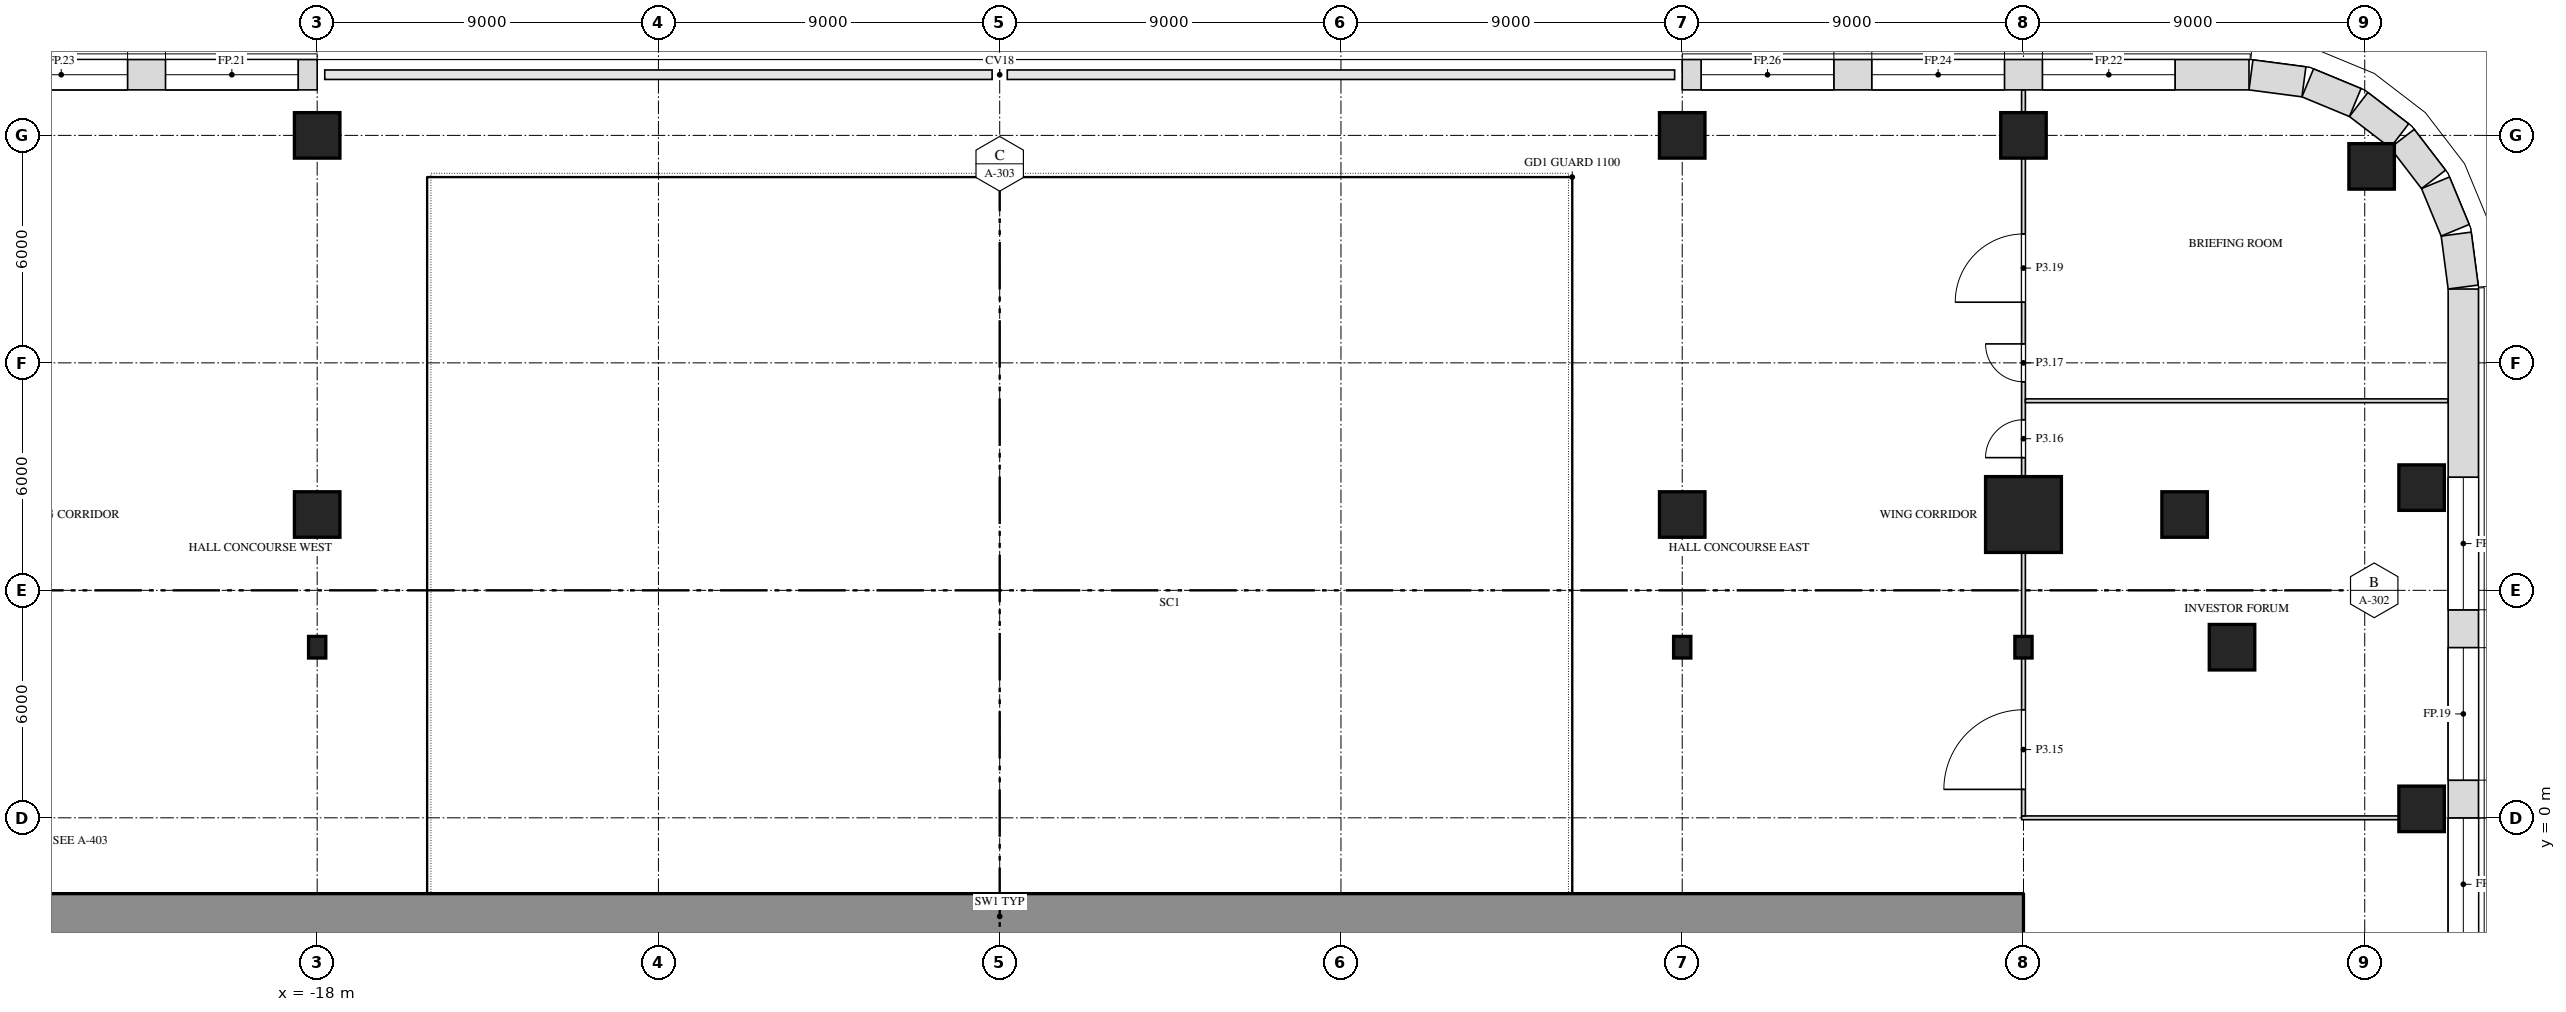
"""IFC4 building model, lengths in metres.
Left out: names, types, materials, properties, quantities, classifications, styles, units other than length and angle.
Written with IfcOpenShell. Run it as: python <this file> out.ifc"""

import sys

from ifc_helpers import new_model, si_unit, direction, frame, frame_2d, origin, origin_2d, place, context, subcontext, project, spatial, rectangle, i_section, extrude, element, fill, save


model = new_model("IFC4")
c1 = context("Model", 3, precision=1e-05, world=origin(), true_north=direction((0.0, 1.0)))
c2 = subcontext(c1, "Body", "Model", "MODEL_VIEW")
j1 = project(units=[si_unit("LENGTHUNIT", "METRE"), si_unit("PLANEANGLEUNIT", "RADIAN")], contexts=[c1])
p1 = place(None, origin())
s1 = spatial("IfcSite", under=j1, at=p1, CompositionType="ELEMENT")
p2 = place(p1, origin())
s2 = spatial("IfcBuilding", under=s1, at=p2, CompositionType="ELEMENT")
p3 = place(p2, frame((0.0, 0.0, 21.0)))
s3 = spatial("IfcBuildingStorey", under=s2, at=p3, CompositionType="ELEMENT", Elevation=21.0)
p4 = place(p3, frame((37.5, 0.236, 0.0), z_axis=(0.0, 0.0, 1.0), x_axis=(1.0, 0.0, 0.0)))
e1 = element("IfcColumn", 1, at=p4, inside=s3, PredefinedType="COLUMN", context=c2, shape_type="SweptSolid", body=[
    extrude(rectangle(XDim=1.2, YDim=1.2, at=origin_2d()), origin(), (0.0, 0.0, 1.0), 6.0),
])
for number, where, z_axis, x_axis in (
    (2, (-18.0, 4.5, 0.0), (0.0, 0.0, 1.0), (1.0, 0.0, 0.0)),
    (3, (18.0, 4.5, 0.0), (0.0, 0.0, 1.0), (1.0, 0.0, 0.0)),
    (4, (27.0, 4.5, 0.0), (0.0, 0.0, 1.0), (1.0, 0.0, 0.0)),
):
    element("IfcColumn", number, at=place(p3, frame(where, z_axis=z_axis, x_axis=x_axis)), inside=s3, PredefinedType="COLUMN", context=c2, shape_type="SweptSolid", body=[
        extrude(i_section(OverallWidth=0.455, OverallDepth=0.569, WebThickness=0.078, FlangeThickness=0.125, at=origin_2d()), origin(), (0.0, 0.0, 1.0), 6.0),
    ])
for number, where, z_axis, x_axis in (
    (5, (32.5, 4.5, 0.0), (0.0, 0.0, 1.0), (1.0, 0.0, 0.0)),
    (6, (-18.0, 8.0, 0.0), (0.0, 0.0, 1.0), (1.0, 0.0, 0.0)),
    (7, (18.0, 8.0, 0.0), (0.0, 0.0, 1.0), (1.0, 0.0, 0.0)),
):
    element("IfcColumn", number, at=place(p3, frame(where, z_axis=z_axis, x_axis=x_axis)), inside=s3, PredefinedType="COLUMN", context=c2, shape_type="SweptSolid", body=[
        extrude(rectangle(XDim=1.2, YDim=1.2, at=origin_2d()), origin(), (0.0, 0.0, 1.0), 6.0),
    ])
p5 = place(p3, frame((27.0, 8.0, 0.0), z_axis=(0.0, 0.0, 1.0), x_axis=(1.0, 0.0, 0.0)))
e8 = element("IfcColumn", 8, at=p5, inside=s3, PredefinedType="COLUMN", context=c2, shape_type="SweptSolid", body=[
    extrude(rectangle(XDim=2.0, YDim=2.0, at=origin_2d()), origin(), (0.0, 0.0, 1.0), 6.0),
])
for number, where, z_axis, x_axis in (
    (9, (31.25, 8.0, 0.0), (0.0, 0.0, 1.0), (1.0, 0.0, 0.0)),
    (10, (37.5, 8.709, 0.0), (0.0, 0.0, 1.0), (1.0, 0.0, 0.0)),
    (11, (36.182, 17.182, 0.0), (0.0, 0.0, 1.0), (1.0, 0.0, 0.0)),
    (12, (-18.0, 18.0, 0.0), (0.0, 0.0, 1.0), (1.0, 0.0, 0.0)),
    (13, (18.0, 18.0, 0.0), (0.0, 0.0, 1.0), (1.0, 0.0, 0.0)),
    (14, (27.0, 18.0, 0.0), (0.0, 0.0, 1.0), (1.0, 0.0, 0.0)),
):
    element("IfcColumn", number, at=place(p3, frame(where, z_axis=z_axis, x_axis=x_axis)), inside=s3, PredefinedType="COLUMN", context=c2, shape_type="SweptSolid", body=[
        extrude(rectangle(XDim=1.2, YDim=1.2, at=origin_2d()), origin(), (0.0, 0.0, 1.0), 6.0),
    ])
p6 = place(p3, frame((-27.0, -2.6, 0.0), z_axis=(0.0, 0.0, 1.0), x_axis=(1.0, 0.0, 0.0)))
e15 = element("IfcWall", 15, at=p6, inside=s3, PredefinedType="SHEAR", context=c2, shape_type="SweptSolid", body=[
    extrude(rectangle(XDim=54.0, YDim=1.2, at=frame_2d((27.0, 0.0))), origin(), (0.0, 0.0, 1.0), 5.7),
])
p7 = place(p3, frame((26.95, 0.0, 0.0), z_axis=(0.0, 0.0, 1.0), x_axis=(1.0, 0.0, 0.0)))
e16 = element("IfcWall", 16, at=p7, inside=s3, PredefinedType="PARTITIONING", context=c2, shape_type="SweptSolid", body=[
    extrude(rectangle(XDim=9.95, YDim=0.1, at=frame_2d((4.975, 0.0))), origin(), (0.0, 0.0, 1.0), 5.088),
])
p8 = place(p3, frame((27.0, 0.05, 0.0), z_axis=(0.0, 0.0, 1.0), x_axis=(0.0, 1.0, 0.0)))
e17 = element("IfcWall", 17, at=p8, inside=s3, PredefinedType="PARTITIONING", context=c2, shape_type="SweptSolid", body=[
    extrude(rectangle(XDim=4.166, YDim=0.1, at=frame_2d((2.083, 0.0))), origin(), (0.0, 0.0, 1.0), 5.088),
])
p9 = place(p8, frame((0.7, 0.0, 0.0)))
e18 = element("IfcOpeningElement", 18, at=p9, cuts=e17, PredefinedType="OPENING", context=c2, shape_type="SweptSolid", body=[
    extrude(rectangle(XDim=2.1, YDim=2.4, at=frame_2d((1.05, 1.2))), frame((0.0, 0.062, 0.0), z_axis=(0.0, -1.0, 0.0), x_axis=(1.0, 0.0, 0.0)), (0.0, 0.0, 1.0), 0.124),
])
p10 = place(p3, frame((27.0, 4.784, 0.0), z_axis=(0.0, 0.0, 1.0), x_axis=(0.0, 1.0, 0.0)))
e19 = element("IfcWall", 19, at=p10, inside=s3, PredefinedType="PARTITIONING", context=c2, shape_type="SweptSolid", body=[
    extrude(rectangle(XDim=2.216, YDim=0.1, at=frame_2d((1.108, 0.0))), origin(), (0.0, 0.0, 1.0), 5.088),
])
p11 = place(p3, frame((27.0, 9.0, 0.0), z_axis=(0.0, 0.0, 1.0), x_axis=(0.0, 1.0, 0.0)))
e20 = element("IfcWall", 20, at=p11, inside=s3, PredefinedType="PARTITIONING", context=c2, shape_type="SweptSolid", body=[
    extrude(rectangle(XDim=8.4, YDim=0.1, at=frame_2d((4.2, 0.0))), origin(), (0.0, 0.0, 1.0), 5.088),
])
p12 = place(p11, frame((0.5, 0.0, 0.0)))
e21 = element("IfcOpeningElement", 21, at=p12, cuts=e20, PredefinedType="OPENING", context=c2, shape_type="SweptSolid", body=[
    extrude(rectangle(XDim=1.0, YDim=2.1, at=frame_2d((0.5, 1.05))), frame((0.0, 0.062, 0.0), z_axis=(0.0, -1.0, 0.0), x_axis=(1.0, 0.0, 0.0)), (0.0, 0.0, 1.0), 0.124),
])
p13 = place(p11, frame((2.5, 0.0, 0.0)))
e22 = element("IfcOpeningElement", 22, at=p13, cuts=e20, PredefinedType="OPENING", context=c2, shape_type="SweptSolid", body=[
    extrude(rectangle(XDim=1.0, YDim=2.1, at=frame_2d((0.5, 1.05))), frame((0.0, 0.062, 0.0), z_axis=(0.0, -1.0, 0.0), x_axis=(1.0, 0.0, 0.0)), (0.0, 0.0, 1.0), 0.124),
])
p14 = place(p11, frame((4.6, 0.0, 0.0)))
e23 = element("IfcOpeningElement", 23, at=p14, cuts=e20, PredefinedType="OPENING", context=c2, shape_type="SweptSolid", body=[
    extrude(rectangle(XDim=1.8, YDim=2.1, at=frame_2d((0.9, 1.05))), frame((0.0, 0.062, 0.0), z_axis=(0.0, -1.0, 0.0), x_axis=(1.0, 0.0, 0.0)), (0.0, 0.0, 1.0), 0.124),
])
p15 = place(p3, frame((27.0, 18.6, 0.0), z_axis=(0.0, 0.0, 1.0), x_axis=(0.0, 1.0, 0.0)))
e24 = element("IfcWall", 24, at=p15, inside=s3, PredefinedType="PARTITIONING", context=c2, shape_type="SweptSolid", body=[
    extrude(rectangle(XDim=0.6, YDim=0.1, at=frame_2d((0.3, 0.0))), origin(), (0.0, 0.0, 1.0), 5.7),
])
p16 = place(p3, frame((27.05, 11.0, 0.0), z_axis=(0.0, 0.0, 1.0), x_axis=(1.0, 0.0, 0.0)))
e25 = element("IfcWall", 25, at=p16, inside=s3, PredefinedType="PARTITIONING", context=c2, shape_type="SweptSolid", body=[
    extrude(rectangle(XDim=11.15, YDim=0.1, at=frame_2d((5.575, 0.0))), origin(), (0.0, 0.0, 1.0), 5.7),
])
p17 = place(p3, frame((38.6, -21.948, 0.0), z_axis=(0.0, 0.0, 1.0), x_axis=(0.0, 1.0, 0.0)))
e26 = element("IfcWall", 26, at=p17, inside=s3, PredefinedType="SOLIDWALL", context=c2, shape_type="SweptSolid", body=[
    extrude(rectangle(XDim=35.895, YDim=0.8, at=frame_2d((17.948, 0.0))), origin(), (0.0, 0.0, 1.0), 5.7),
])
p18 = place(p17, frame((4.964, 0.0, 1.0)))
e27 = element("IfcOpeningElement", 27, at=p18, cuts=e26, PredefinedType="OPENING", context=c2, shape_type="SweptSolid", body=[
    extrude(rectangle(XDim=3.5, YDim=4.0, at=frame_2d((1.75, 2.0))), frame((0.0, 0.412, 0.0), z_axis=(0.0, -1.0, 0.0), x_axis=(1.0, 0.0, 0.0)), (0.0, 0.0, 1.0), 0.824),
])
p19 = place(p17, frame((9.458, 0.0, 1.0)))
e28 = element("IfcOpeningElement", 28, at=p19, cuts=e26, PredefinedType="OPENING", context=c2, shape_type="SweptSolid", body=[
    extrude(rectangle(XDim=3.5, YDim=4.0, at=frame_2d((1.75, 2.0))), frame((0.0, 0.412, 0.0), z_axis=(0.0, -1.0, 0.0), x_axis=(1.0, 0.0, 0.0)), (0.0, 0.0, 1.0), 0.824),
])
p20 = place(p17, frame((13.951, 0.0, 1.0)))
e29 = element("IfcOpeningElement", 29, at=p20, cuts=e26, PredefinedType="OPENING", context=c2, shape_type="SweptSolid", body=[
    extrude(rectangle(XDim=3.5, YDim=4.0, at=frame_2d((1.75, 2.0))), frame((0.0, 0.412, 0.0), z_axis=(0.0, -1.0, 0.0), x_axis=(1.0, 0.0, 0.0)), (0.0, 0.0, 1.0), 0.824),
])
p21 = place(p17, frame((18.444, 0.0, 1.0)))
e30 = element("IfcOpeningElement", 30, at=p21, cuts=e26, PredefinedType="OPENING", context=c2, shape_type="SweptSolid", body=[
    extrude(rectangle(XDim=3.5, YDim=4.0, at=frame_2d((1.75, 2.0))), frame((0.0, 0.412, 0.0), z_axis=(0.0, -1.0, 0.0), x_axis=(1.0, 0.0, 0.0)), (0.0, 0.0, 1.0), 0.824),
])
p22 = place(p17, frame((22.938, 0.0, 1.0)))
e31 = element("IfcOpeningElement", 31, at=p22, cuts=e26, PredefinedType="OPENING", context=c2, shape_type="SweptSolid", body=[
    extrude(rectangle(XDim=3.5, YDim=4.0, at=frame_2d((1.75, 2.0))), frame((0.0, 0.412, 0.0), z_axis=(0.0, -1.0, 0.0), x_axis=(1.0, 0.0, 0.0)), (0.0, 0.0, 1.0), 0.824),
])
p23 = place(p17, frame((27.431, 0.0, 1.0)))
e32 = element("IfcOpeningElement", 32, at=p23, cuts=e26, PredefinedType="OPENING", context=c2, shape_type="SweptSolid", body=[
    extrude(rectangle(XDim=3.5, YDim=4.0, at=frame_2d((1.75, 2.0))), frame((0.0, 0.412, 0.0), z_axis=(0.0, -1.0, 0.0), x_axis=(1.0, 0.0, 0.0)), (0.0, 0.0, 1.0), 0.824),
])
p24 = place(p3, frame((38.597, 14.0, 0.0), z_axis=(0.0, 0.0, 1.0), x_axis=(-0.130517283865, 0.99144603414, 0.0)))
e33 = element("IfcWall", 33, at=p24, inside=s3, PredefinedType="SOLIDWALL", context=c2, shape_type="SweptSolid", body=[
    extrude(rectangle(XDim=1.408, YDim=0.8, at=frame_2d((0.704, 0.0))), origin(), (0.0, 0.0, 1.0), 5.7),
])
p25 = place(p3, frame((38.386, 15.497, 0.0), z_axis=(0.0, 0.0, 1.0), x_axis=(-0.38276009378, 0.923847774587, 0.0)))
e34 = element("IfcWall", 34, at=p25, inside=s3, PredefinedType="SOLIDWALL", context=c2, shape_type="SweptSolid", body=[
    extrude(rectangle(XDim=1.355, YDim=0.8, at=frame_2d((0.678, 0.0))), origin(), (0.0, 0.0, 1.0), 5.7),
])
for number, where, z_axis, x_axis in (
    (35, (37.815, 16.84, 0.0), (0.0, 0.0, 1.0), (-0.609, 0.793, 0.0)),
    (36, (36.916, 17.989, 0.0), (0.0, 0.0, 1.0), (-0.793, 0.609, 0.0)),
):
    element("IfcWall", number, at=place(p3, frame(where, z_axis=z_axis, x_axis=x_axis)), inside=s3, PredefinedType="SOLIDWALL", context=c2, shape_type="SweptSolid", body=[
        extrude(rectangle(XDim=1.356, YDim=0.8, at=frame_2d((0.678, 0.0))), origin(), (0.0, 0.0, 1.0), 5.7),
    ])
p26 = place(p3, frame((35.75, 18.867, 0.0), z_axis=(0.0, 0.0, 1.0), x_axis=(-0.923847774587, 0.38276009378, 0.0)))
e37 = element("IfcWall", 37, at=p26, inside=s3, PredefinedType="SOLIDWALL", context=c2, shape_type="SweptSolid", body=[
    extrude(rectangle(XDim=1.355, YDim=0.8, at=frame_2d((0.678, 0.0))), origin(), (0.0, 0.0, 1.0), 5.7),
])
p27 = place(p3, frame((34.396, 19.413, 0.0), z_axis=(0.0, 0.0, 1.0), x_axis=(-0.99144603414, 0.130517283865, 0.0)))
e38 = element("IfcWall", 38, at=p27, inside=s3, PredefinedType="SOLIDWALL", context=c2, shape_type="SweptSolid", body=[
    extrude(rectangle(XDim=1.408, YDim=0.8, at=frame_2d((0.704, 0.0))), origin(), (0.0, 0.0, 1.0), 5.7),
])
p28 = place(p3, frame((32.948, 19.6, 0.0), z_axis=(0.0, 0.0, 1.0), x_axis=(-1.0, 0.0, 0.0)))
e39 = element("IfcWall", 39, at=p28, inside=s3, PredefinedType="SOLIDWALL", context=c2, shape_type="SweptSolid", body=[
    extrude(rectangle(XDim=14.948, YDim=0.8, at=frame_2d((7.474, 0.0))), origin(), (0.0, 0.0, 1.0), 5.7),
])
p29 = place(p28, frame((1.948, 0.0, 1.0)))
e40 = element("IfcOpeningElement", 40, at=p29, cuts=e39, PredefinedType="OPENING", context=c2, shape_type="SweptSolid", body=[
    extrude(rectangle(XDim=3.5, YDim=4.0, at=frame_2d((1.75, 2.0))), frame((0.0, 0.412, 0.0), z_axis=(0.0, -1.0, 0.0), x_axis=(1.0, 0.0, 0.0)), (0.0, 0.0, 1.0), 0.824),
])
p30 = place(p28, frame((6.448, 0.0, 1.0)))
e41 = element("IfcOpeningElement", 41, at=p30, cuts=e39, PredefinedType="OPENING", context=c2, shape_type="SweptSolid", body=[
    extrude(rectangle(XDim=3.5, YDim=4.0, at=frame_2d((1.75, 2.0))), frame((0.0, 0.412, 0.0), z_axis=(0.0, -1.0, 0.0), x_axis=(1.0, 0.0, 0.0)), (0.0, 0.0, 1.0), 0.824),
])
p31 = place(p28, frame((10.948, 0.0, 1.0)))
e42 = element("IfcOpeningElement", 42, at=p31, cuts=e39, PredefinedType="OPENING", context=c2, shape_type="SweptSolid", body=[
    extrude(rectangle(XDim=3.5, YDim=4.0, at=frame_2d((1.75, 2.0))), frame((0.0, 0.412, 0.0), z_axis=(0.0, -1.0, 0.0), x_axis=(1.0, 0.0, 0.0)), (0.0, 0.0, 1.0), 0.824),
])
p32 = place(p3, frame((-18.0, 19.6, 0.0), z_axis=(0.0, 0.0, 1.0), x_axis=(-1.0, 0.0, 0.0)))
e43 = element("IfcWall", 43, at=p32, inside=s3, PredefinedType="SOLIDWALL", context=c2, shape_type="SweptSolid", body=[
    extrude(rectangle(XDim=14.948, YDim=0.8, at=frame_2d((7.474, 0.0))), origin(), (0.0, 0.0, 1.0), 5.7),
])
p33 = place(p32, frame((0.5, 0.0, 1.0)))
e44 = element("IfcOpeningElement", 44, at=p33, cuts=e43, PredefinedType="OPENING", context=c2, shape_type="SweptSolid", body=[
    extrude(rectangle(XDim=3.5, YDim=4.0, at=frame_2d((1.75, 2.0))), frame((0.0, 0.412, 0.0), z_axis=(0.0, -1.0, 0.0), x_axis=(1.0, 0.0, 0.0)), (0.0, 0.0, 1.0), 0.824),
])
p34 = place(p32, frame((5.0, 0.0, 1.0)))
e45 = element("IfcOpeningElement", 45, at=p34, cuts=e43, PredefinedType="OPENING", context=c2, shape_type="SweptSolid", body=[
    extrude(rectangle(XDim=3.5, YDim=4.0, at=frame_2d((1.75, 2.0))), frame((0.0, 0.412, 0.0), z_axis=(0.0, -1.0, 0.0), x_axis=(1.0, 0.0, 0.0)), (0.0, 0.0, 1.0), 0.824),
])
p35 = place(p32, frame((9.5, 0.0, 1.0)))
e46 = element("IfcOpeningElement", 46, at=p35, cuts=e43, PredefinedType="OPENING", context=c2, shape_type="SweptSolid", body=[
    extrude(rectangle(XDim=3.5, YDim=4.0, at=frame_2d((1.75, 2.0))), frame((0.0, 0.412, 0.0), z_axis=(0.0, -1.0, 0.0), x_axis=(1.0, 0.0, 0.0)), (0.0, 0.0, 1.0), 0.824),
])
p36 = place(p9, origin())
e47 = element("IfcDoor", 47, at=p36, inside=s3, OperationType="DOUBLE_DOOR_SINGLE_SWING", PredefinedType="DOOR", context=c2, shape_type="SweptSolid", body=[
    extrude(rectangle(XDim=2.1, YDim=2.4, at=frame_2d((1.05, 1.2))), frame((0.0, 0.025, 0.0), z_axis=(0.0, -1.0, 0.0), x_axis=(1.0, 0.0, 0.0)), (0.0, 0.0, 1.0), 0.05),
])
fill(e18, e47)
p37 = place(p12, origin())
e48 = element("IfcDoor", 48, at=p37, inside=s3, OperationType="SINGLE_SWING_LEFT", PredefinedType="DOOR", context=c2, shape_type="SweptSolid", body=[
    extrude(rectangle(XDim=1.0, YDim=2.1, at=frame_2d((0.5, 1.05))), frame((0.0, 0.025, 0.0), z_axis=(0.0, -1.0, 0.0), x_axis=(1.0, 0.0, 0.0)), (0.0, 0.0, 1.0), 0.05),
])
fill(e21, e48)
p38 = place(p13, origin())
e49 = element("IfcDoor", 49, at=p38, inside=s3, OperationType="SINGLE_SWING_RIGHT", PredefinedType="DOOR", context=c2, shape_type="SweptSolid", body=[
    extrude(rectangle(XDim=1.0, YDim=2.1, at=frame_2d((0.5, 1.05))), frame((0.0, 0.025, 0.0), z_axis=(0.0, -1.0, 0.0), x_axis=(1.0, 0.0, 0.0)), (0.0, 0.0, 1.0), 0.05),
])
fill(e22, e49)
p39 = place(p14, origin())
e50 = element("IfcDoor", 50, at=p39, inside=s3, OperationType="DOUBLE_DOOR_SINGLE_SWING", PredefinedType="DOOR", context=c2, shape_type="SweptSolid", body=[
    extrude(rectangle(XDim=1.8, YDim=2.1, at=frame_2d((0.9, 1.05))), frame((0.0, 0.025, 0.0), z_axis=(0.0, -1.0, 0.0), x_axis=(1.0, 0.0, 0.0)), (0.0, 0.0, 1.0), 0.05),
])
fill(e23, e50)
p40 = place(p21, origin())
e51 = element("IfcWindow", 51, at=p40, inside=s3, PartitioningType="SINGLE_PANEL", PredefinedType="WINDOW", context=c2, shape_type="SweptSolid", body=[
    extrude(rectangle(XDim=3.5, YDim=4.0, at=frame_2d((1.75, 2.0))), frame((0.0, 0.03, 0.0), z_axis=(0.0, -1.0, 0.0), x_axis=(1.0, 0.0, 0.0)), (0.0, 0.0, 1.0), 0.06),
])
fill(e30, e51)
p41 = place(p22, origin())
e52 = element("IfcWindow", 52, at=p41, inside=s3, PartitioningType="SINGLE_PANEL", PredefinedType="WINDOW", context=c2, shape_type="SweptSolid", body=[
    extrude(rectangle(XDim=3.5, YDim=4.0, at=frame_2d((1.75, 2.0))), frame((0.0, 0.03, 0.0), z_axis=(0.0, -1.0, 0.0), x_axis=(1.0, 0.0, 0.0)), (0.0, 0.0, 1.0), 0.06),
])
fill(e31, e52)
p42 = place(p23, origin())
e53 = element("IfcWindow", 53, at=p42, inside=s3, PartitioningType="SINGLE_PANEL", PredefinedType="WINDOW", context=c2, shape_type="SweptSolid", body=[
    extrude(rectangle(XDim=3.5, YDim=4.0, at=frame_2d((1.75, 2.0))), frame((0.0, 0.03, 0.0), z_axis=(0.0, -1.0, 0.0), x_axis=(1.0, 0.0, 0.0)), (0.0, 0.0, 1.0), 0.06),
])
fill(e32, e53)
p43 = place(p33, origin())
e54 = element("IfcWindow", 54, at=p43, inside=s3, PartitioningType="SINGLE_PANEL", PredefinedType="WINDOW", context=c2, shape_type="SweptSolid", body=[
    extrude(rectangle(XDim=3.5, YDim=4.0, at=frame_2d((1.75, 2.0))), frame((0.0, 0.03, 0.0), z_axis=(0.0, -1.0, 0.0), x_axis=(1.0, 0.0, 0.0)), (0.0, 0.0, 1.0), 0.06),
])
fill(e44, e54)
p44 = place(p29, origin())
e55 = element("IfcWindow", 55, at=p44, inside=s3, PartitioningType="SINGLE_PANEL", PredefinedType="WINDOW", context=c2, shape_type="SweptSolid", body=[
    extrude(rectangle(XDim=3.5, YDim=4.0, at=frame_2d((1.75, 2.0))), frame((0.0, 0.03, 0.0), z_axis=(0.0, -1.0, 0.0), x_axis=(1.0, 0.0, 0.0)), (0.0, 0.0, 1.0), 0.06),
])
fill(e40, e55)
p45 = place(p34, origin())
e56 = element("IfcWindow", 56, at=p45, inside=s3, PartitioningType="SINGLE_PANEL", PredefinedType="WINDOW", context=c2, shape_type="SweptSolid", body=[
    extrude(rectangle(XDim=3.5, YDim=4.0, at=frame_2d((1.75, 2.0))), frame((0.0, 0.03, 0.0), z_axis=(0.0, -1.0, 0.0), x_axis=(1.0, 0.0, 0.0)), (0.0, 0.0, 1.0), 0.06),
])
fill(e45, e56)
p46 = place(p30, origin())
e57 = element("IfcWindow", 57, at=p46, inside=s3, PartitioningType="SINGLE_PANEL", PredefinedType="WINDOW", context=c2, shape_type="SweptSolid", body=[
    extrude(rectangle(XDim=3.5, YDim=4.0, at=frame_2d((1.75, 2.0))), frame((0.0, 0.03, 0.0), z_axis=(0.0, -1.0, 0.0), x_axis=(1.0, 0.0, 0.0)), (0.0, 0.0, 1.0), 0.06),
])
fill(e41, e57)
p47 = place(p31, origin())
e58 = element("IfcWindow", 58, at=p47, inside=s3, PartitioningType="SINGLE_PANEL", PredefinedType="WINDOW", context=c2, shape_type="SweptSolid", body=[
    extrude(rectangle(XDim=3.5, YDim=4.0, at=frame_2d((1.75, 2.0))), frame((0.0, 0.03, 0.0), z_axis=(0.0, -1.0, 0.0), x_axis=(1.0, 0.0, 0.0)), (0.0, 0.0, 1.0), 0.06),
])
fill(e42, e58)
save(model, sys.argv[1])
